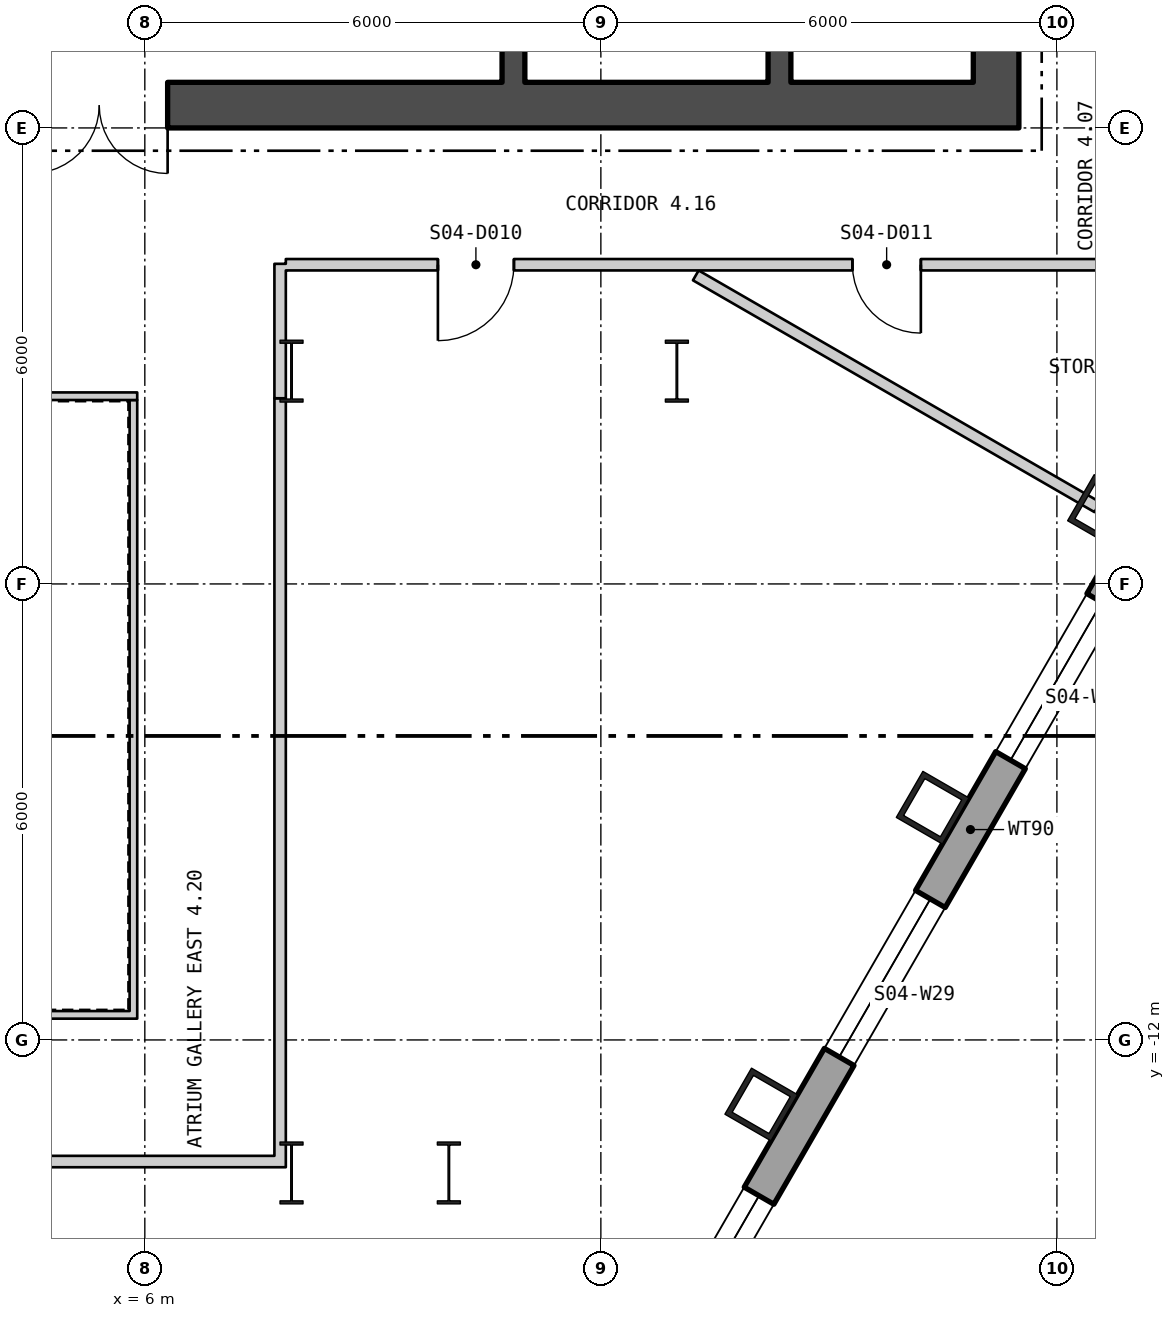
"""IFC4 building model, lengths in metres.
Left out: names, types, materials, properties, quantities, classifications, styles, units other than length and angle.
Written with IfcOpenShell. Run it as: python <this file> out.ifc"""

import sys

from ifc_helpers import new_model, si_unit, direction, frame, frame_2d, origin, origin_2d, place, context, subcontext, project, spatial, polyline, rectangle, hollow_rectangle, i_section, outline, extrude, element, fill, save


model = new_model("IFC4")
c1 = context("Model", 3, precision=1e-05, world=origin(), true_north=direction((0.0, 1.0)))
c2 = subcontext(c1, "Body", "Model", "MODEL_VIEW")
j1 = project(units=[si_unit("LENGTHUNIT", "METRE"), si_unit("PLANEANGLEUNIT", "RADIAN")], contexts=[c1])
p1 = place(None, origin())
s1 = spatial("IfcSite", under=j1, at=p1, CompositionType="ELEMENT")
p2 = place(p1, origin())
s2 = spatial("IfcBuilding", under=s1, at=p2, CompositionType="ELEMENT")
p3 = place(p2, frame((0.0, 0.0, 60.3)))
s3 = spatial("IfcBuildingStorey", under=s2, at=p3, CompositionType="ELEMENT", Elevation=60.3)
for number, where, z_axis, x_axis in (
    (1, (14.11, -12.849, 0.0), (0.0, 0.0, 1.0), (0.5, 0.866, 0.0)),
    (2, (16.365, -8.944, 0.0), (0.0, 0.0, 1.0), (0.5, 0.866, 0.0)),
    (3, (18.619, -5.04, 0.0), (0.0, 0.0, 1.0), (0.5, 0.866, 0.0)),
):
    element("IfcColumn", number, at=place(p3, frame(where, z_axis=z_axis, x_axis=x_axis)), inside=s3, PredefinedType="COLUMN", context=c2, shape_type="SweptSolid", body=[
        extrude(hollow_rectangle(XDim=0.7, YDim=0.7, WallThickness=0.07, at=origin_2d()), origin(), (0.0, 0.0, 1.0), 4.5),
    ])
for number, where, z_axis, x_axis in (
    (4, (7.93, -3.2, 0.0), (0.0, 0.0, 1.0), (1.0, 0.0, 0.0)),
    (5, (7.93, -13.75, 0.0), (0.0, 0.0, 1.0), (1.0, 0.0, 0.0)),
    (6, (13.0, -3.2, 0.0), (0.0, 0.0, 1.0), (1.0, 0.0, 0.0)),
    (7, (10.0, -13.75, 0.0), (0.0, 0.0, 1.0), (1.0, 0.0, 0.0)),
):
    element("IfcColumn", number, at=place(p3, frame(where, z_axis=z_axis, x_axis=x_axis)), inside=s3, PredefinedType="COLUMN", context=c2, shape_type="SweptSolid", body=[
        extrude(i_section(OverallWidth=0.303, OverallDepth=0.814, WebThickness=0.021, FlangeThickness=0.04, at=origin_2d()), origin(), (0.0, 0.0, 1.0), 4.5),
    ])
p4 = place(p3, frame((5.425, -29.042, -0.18), z_axis=(0.0, 0.0, 1.0), x_axis=(0.499999388847, 0.866025756634, 0.0)))
e8 = element("IfcWall", 8, at=p4, inside=s3, PredefinedType="SOLIDWALL", context=c2, shape_type="SweptSolid", body=[
    extrude(outline(polyline([(-0.13, -0.225), (45.88, -0.225), (45.62, 0.225), (0.13, 0.225), (-0.13, -0.225)])), origin(), (0.0, 0.0, 1.0), 4.28),
])
p5 = place(p4, frame((1.425, 0.0, 1.08)))
e9 = element("IfcOpeningElement", 9, at=p5, cuts=e8, PredefinedType="OPENING", context=c2, shape_type="SweptSolid", body=[
    extrude(rectangle(XDim=2.4, YDim=2.6, at=frame_2d((1.2, 1.3))), frame((0.0, 0.235, 0.0), z_axis=(0.0, -1.0, 0.0), x_axis=(1.0, 0.0, 0.0)), (0.0, 0.0, 1.0), 0.47),
])
p6 = place(p4, frame((5.895, 0.0, 1.08)))
e10 = element("IfcOpeningElement", 10, at=p6, cuts=e8, PredefinedType="OPENING", context=c2, shape_type="SweptSolid", body=[
    extrude(rectangle(XDim=2.4, YDim=2.6, at=frame_2d((1.2, 1.3))), frame((0.0, 0.235, 0.0), z_axis=(0.0, -1.0, 0.0), x_axis=(1.0, 0.0, 0.0)), (0.0, 0.0, 1.0), 0.47),
])
p7 = place(p4, frame((10.403, 0.0, 1.08)))
e11 = element("IfcOpeningElement", 11, at=p7, cuts=e8, PredefinedType="OPENING", context=c2, shape_type="SweptSolid", body=[
    extrude(rectangle(XDim=2.4, YDim=2.6, at=frame_2d((1.2, 1.3))), frame((0.0, 0.235, 0.0), z_axis=(0.0, -1.0, 0.0), x_axis=(1.0, 0.0, 0.0)), (0.0, 0.0, 1.0), 0.47),
])
p8 = place(p4, frame((14.912, 0.0, 1.08)))
e12 = element("IfcOpeningElement", 12, at=p8, cuts=e8, PredefinedType="OPENING", context=c2, shape_type="SweptSolid", body=[
    extrude(rectangle(XDim=2.4, YDim=2.6, at=frame_2d((1.2, 1.3))), frame((0.0, 0.235, 0.0), z_axis=(0.0, -1.0, 0.0), x_axis=(1.0, 0.0, 0.0)), (0.0, 0.0, 1.0), 0.47),
])
p9 = place(p4, frame((19.421, 0.0, 1.08)))
e13 = element("IfcOpeningElement", 13, at=p9, cuts=e8, PredefinedType="OPENING", context=c2, shape_type="SweptSolid", body=[
    extrude(rectangle(XDim=2.4, YDim=2.6, at=frame_2d((1.2, 1.3))), frame((0.0, 0.235, 0.0), z_axis=(0.0, -1.0, 0.0), x_axis=(1.0, 0.0, 0.0)), (0.0, 0.0, 1.0), 0.47),
])
p10 = place(p4, frame((23.929, 0.0, 1.08)))
e14 = element("IfcOpeningElement", 14, at=p10, cuts=e8, PredefinedType="OPENING", context=c2, shape_type="SweptSolid", body=[
    extrude(rectangle(XDim=2.4, YDim=2.6, at=frame_2d((1.2, 1.3))), frame((0.0, 0.235, 0.0), z_axis=(0.0, -1.0, 0.0), x_axis=(1.0, 0.0, 0.0)), (0.0, 0.0, 1.0), 0.47),
])
p11 = place(p4, frame((28.438, 0.0, 1.08)))
e15 = element("IfcOpeningElement", 15, at=p11, cuts=e8, PredefinedType="OPENING", context=c2, shape_type="SweptSolid", body=[
    extrude(rectangle(XDim=2.4, YDim=2.6, at=frame_2d((1.2, 1.3))), frame((0.0, 0.235, 0.0), z_axis=(0.0, -1.0, 0.0), x_axis=(1.0, 0.0, 0.0)), (0.0, 0.0, 1.0), 0.47),
])
p12 = place(p4, frame((32.947, 0.0, 1.08)))
e16 = element("IfcOpeningElement", 16, at=p12, cuts=e8, PredefinedType="OPENING", context=c2, shape_type="SweptSolid", body=[
    extrude(rectangle(XDim=2.4, YDim=2.6, at=frame_2d((1.2, 1.3))), frame((0.0, 0.235, 0.0), z_axis=(0.0, -1.0, 0.0), x_axis=(1.0, 0.0, 0.0)), (0.0, 0.0, 1.0), 0.47),
])
p13 = place(p4, frame((37.455, 0.0, 1.08)))
e17 = element("IfcOpeningElement", 17, at=p13, cuts=e8, PredefinedType="OPENING", context=c2, shape_type="SweptSolid", body=[
    extrude(rectangle(XDim=2.4, YDim=2.6, at=frame_2d((1.2, 1.3))), frame((0.0, 0.235, 0.0), z_axis=(0.0, -1.0, 0.0), x_axis=(1.0, 0.0, 0.0)), (0.0, 0.0, 1.0), 0.47),
])
p14 = place(p4, frame((41.925, 0.0, 1.08)))
e18 = element("IfcOpeningElement", 18, at=p14, cuts=e8, PredefinedType="OPENING", context=c2, shape_type="SweptSolid", body=[
    extrude(rectangle(XDim=2.4, YDim=2.6, at=frame_2d((1.2, 1.3))), frame((0.0, 0.235, 0.0), z_axis=(0.0, -1.0, 0.0), x_axis=(1.0, 0.0, 0.0)), (0.0, 0.0, 1.0), 0.47),
])
p15 = place(p3, frame((-5.9, -11.67, 0.0), z_axis=(0.0, 0.0, 1.0), x_axis=(1.0, 0.0, 0.0)))
e19 = element("IfcWall", 19, at=p15, inside=s3, PredefinedType="PARTITIONING", context=c2, shape_type="SweptSolid", body=[
    extrude(rectangle(XDim=11.8, YDim=0.1, at=frame_2d((5.9, 0.0))), origin(), (0.0, 0.0, 1.0), 4.3),
])
p16 = place(p3, frame((5.85, -11.62, 0.0), z_axis=(0.0, 0.0, 1.0), x_axis=(0.0, 1.0, 0.0)))
e20 = element("IfcWall", 20, at=p16, inside=s3, PredefinedType="PARTITIONING", context=c2, shape_type="SweptSolid", body=[
    extrude(rectangle(XDim=8.04, YDim=0.1, at=frame_2d((4.02, 0.0))), origin(), (0.0, 0.0, 1.0), 4.3),
])
p17 = place(p3, frame((5.9, -3.53, 0.0), z_axis=(0.0, 0.0, 1.0), x_axis=(-1.0, 0.0, 0.0)))
e21 = element("IfcWall", 21, at=p17, inside=s3, PredefinedType="PARTITIONING", context=c2, shape_type="SweptSolid", body=[
    extrude(rectangle(XDim=11.8, YDim=0.1, at=frame_2d((5.9, 0.0))), origin(), (0.0, 0.0, 1.0), 4.3),
])
p18 = place(p3, frame((-17.5, 0.3, 0.0), z_axis=(0.0, 0.0, 1.0), x_axis=(1.0, 0.0, 0.0)))
e22 = element("IfcWall", 22, at=p18, inside=s3, PredefinedType="SHEAR", context=c2, shape_type="SweptSolid", body=[
    extrude(rectangle(XDim=35.0, YDim=0.6, at=frame_2d((17.5, 0.0))), origin(), (0.0, 0.0, 1.0), 4.3),
])
p19 = place(p18, frame((12.0, 0.0, 0.0)))
e23 = element("IfcOpeningElement", 23, at=p19, cuts=e22, PredefinedType="OPENING", context=c2, shape_type="SweptSolid", body=[
    extrude(rectangle(XDim=1.8, YDim=2.4, at=frame_2d((0.9, 1.2))), frame((0.0, 0.31, 0.0), z_axis=(0.0, -1.0, 0.0), x_axis=(1.0, 0.0, 0.0)), (0.0, 0.0, 1.0), 0.62),
])
p20 = place(p18, frame((22.0, 0.0, 0.0)))
e24 = element("IfcOpeningElement", 24, at=p20, cuts=e22, PredefinedType="OPENING", context=c2, shape_type="SweptSolid", body=[
    extrude(rectangle(XDim=1.8, YDim=2.4, at=frame_2d((0.9, 1.2))), frame((0.0, 0.31, 0.0), z_axis=(0.0, -1.0, 0.0), x_axis=(1.0, 0.0, 0.0)), (0.0, 0.0, 1.0), 0.62),
])
p21 = place(p3, frame((17.2, 0.6, 0.0), z_axis=(0.0, 0.0, 1.0), x_axis=(0.0, 1.0, 0.0)))
e25 = element("IfcWall", 25, at=p21, inside=s3, PredefinedType="SHEAR", context=c2, shape_type="SweptSolid", body=[
    extrude(rectangle(XDim=16.8, YDim=0.6, at=frame_2d((8.4, 0.0))), origin(), (0.0, 0.0, 1.0), 4.3),
])
p22 = place(p21, frame((5.7, 0.0, 0.0)))
e26 = element("IfcOpeningElement", 26, at=p22, cuts=e25, PredefinedType="OPENING", context=c2, shape_type="SweptSolid", body=[
    extrude(rectangle(XDim=1.5, YDim=2.1, at=frame_2d((0.75, 1.05))), frame((0.0, 0.31, 0.0), z_axis=(0.0, -1.0, 0.0), x_axis=(1.0, 0.0, 0.0)), (0.0, 0.0, 1.0), 0.62),
])
p23 = place(p21, frame((0.454, 0.0, 0.0)))
e27 = element("IfcOpeningElement", 27, at=p23, cuts=e25, PredefinedType="OPENING", context=c2, shape_type="SweptSolid", body=[
    extrude(rectangle(XDim=1.0, YDim=2.1, at=frame_2d((0.5, 1.05))), frame((0.0, 0.31, 0.0), z_axis=(0.0, -1.0, 0.0), x_axis=(1.0, 0.0, 0.0)), (0.0, 0.0, 1.0), 0.62),
])
p24 = place(p21, frame((3.354, 0.0, 0.0)))
e28 = element("IfcOpeningElement", 28, at=p24, cuts=e25, PredefinedType="OPENING", context=c2, shape_type="SweptSolid", body=[
    extrude(rectangle(XDim=0.9, YDim=2.1, at=frame_2d((0.45, 1.05))), frame((0.0, 0.31, 0.0), z_axis=(0.0, -1.0, 0.0), x_axis=(1.0, 0.0, 0.0)), (0.0, 0.0, 1.0), 0.62),
])
p25 = place(p21, frame((10.527, 0.0, 0.0)))
e29 = element("IfcOpeningElement", 29, at=p25, cuts=e25, PredefinedType="OPENING", context=c2, shape_type="SweptSolid", body=[
    extrude(rectangle(XDim=0.9, YDim=2.1, at=frame_2d((0.45, 1.05))), frame((0.0, 0.31, 0.0), z_axis=(0.0, -1.0, 0.0), x_axis=(1.0, 0.0, 0.0)), (0.0, 0.0, 1.0), 0.62),
])
p26 = place(p21, frame((15.327, 0.0, 0.0)))
e30 = element("IfcOpeningElement", 30, at=p26, cuts=e25, PredefinedType="OPENING", context=c2, shape_type="SweptSolid", body=[
    extrude(rectangle(XDim=0.9, YDim=2.1, at=frame_2d((0.45, 1.05))), frame((0.0, 0.31, 0.0), z_axis=(0.0, -1.0, 0.0), x_axis=(1.0, 0.0, 0.0)), (0.0, 0.0, 1.0), 0.62),
])
p27 = place(p3, frame((10.85, 0.6, 0.0), z_axis=(0.0, 0.0, 1.0), x_axis=(0.0, 1.0, 0.0)))
e31 = element("IfcWall", 31, at=p27, inside=s3, PredefinedType="SHEAR", context=c2, shape_type="SweptSolid", body=[
    extrude(rectangle(XDim=16.8, YDim=0.3, at=frame_2d((8.4, 0.0))), origin(), (0.0, 0.0, 1.0), 4.3),
])
p28 = place(p27, frame((5.075, 0.0, 0.0)))
e32 = element("IfcOpeningElement", 32, at=p28, cuts=e31, PredefinedType="OPENING", context=c2, shape_type="SweptSolid", body=[
    extrude(rectangle(XDim=1.25, YDim=2.1, at=frame_2d((0.625, 1.05))), frame((0.0, 0.16, 0.0), z_axis=(0.0, -1.0, 0.0), x_axis=(1.0, 0.0, 0.0)), (0.0, 0.0, 1.0), 0.32),
])
p29 = place(p27, frame((1.525, 0.0, 0.0)))
e33 = element("IfcOpeningElement", 33, at=p29, cuts=e31, PredefinedType="OPENING", context=c2, shape_type="SweptSolid", body=[
    extrude(rectangle(XDim=1.0, YDim=2.1, at=frame_2d((0.5, 1.05))), frame((0.0, 0.16, 0.0), z_axis=(0.0, -1.0, 0.0), x_axis=(1.0, 0.0, 0.0)), (0.0, 0.0, 1.0), 0.32),
])
p30 = place(p3, frame((14.35, 0.6, 0.0), z_axis=(0.0, 0.0, 1.0), x_axis=(0.0, 1.0, 0.0)))
e34 = element("IfcWall", 34, at=p30, inside=s3, PredefinedType="SHEAR", context=c2, shape_type="SweptSolid", body=[
    extrude(rectangle(XDim=16.8, YDim=0.3, at=frame_2d((8.4, 0.0))), origin(), (0.0, 0.0, 1.0), 4.3),
])
p31 = place(p30, frame((5.7, 0.0, 0.0)))
e35 = element("IfcOpeningElement", 35, at=p31, cuts=e34, PredefinedType="OPENING", context=c2, shape_type="SweptSolid", body=[
    extrude(rectangle(XDim=1.5, YDim=2.1, at=frame_2d((0.75, 1.05))), frame((0.0, 0.16, 0.0), z_axis=(0.0, -1.0, 0.0), x_axis=(1.0, 0.0, 0.0)), (0.0, 0.0, 1.0), 0.32),
])
p32 = place(p3, frame((4.3, -13.6, 0.0), z_axis=(0.0, 0.0, 1.0), x_axis=(1.0, 0.0, 0.0)))
e36 = element("IfcWall", 36, at=p32, inside=s3, PredefinedType="PARTITIONING", context=c2, shape_type="SweptSolid", body=[
    extrude(rectangle(XDim=3.405, YDim=0.15, at=frame_2d((1.702, 0.0))), origin(), (0.0, 0.0, 1.0), 3.39),
])
p33 = place(p3, frame((7.78, -13.675, 0.0), z_axis=(0.0, 0.0, 1.0), x_axis=(0.0, 1.0, 0.0)))
e37 = element("IfcWall", 37, at=p33, inside=s3, PredefinedType="PARTITIONING", context=c2, shape_type="SweptSolid", body=[
    extrude(rectangle(XDim=10.118, YDim=0.15, at=frame_2d((5.059, 0.0))), origin(), (0.0, 0.0, 1.0), 3.61),
])
p34 = place(p3, frame((7.78, -3.557, 0.0), z_axis=(0.0, 0.0, 1.0), x_axis=(0.0, 1.0, 0.0)))
e38 = element("IfcWall", 38, at=p34, inside=s3, PredefinedType="PARTITIONING", context=c2, shape_type="SweptSolid", body=[
    extrude(rectangle(XDim=1.769, YDim=0.15, at=frame_2d((0.884, 0.0))), origin(), (0.0, 0.0, 1.0), 4.3),
])
p35 = place(p3, frame((7.855, -1.8, 0.0), z_axis=(0.0, 0.0, 1.0), x_axis=(1.0, 0.0, 0.0)))
e39 = element("IfcWall", 39, at=p35, inside=s3, PredefinedType="PARTITIONING", context=c2, shape_type="SweptSolid", body=[
    extrude(rectangle(XDim=11.37, YDim=0.15, at=frame_2d((5.685, 0.0))), origin(), (0.0, 0.0, 1.0), 4.3),
])
p36 = place(p35, frame((2.001, 0.0, 0.0)))
e40 = element("IfcOpeningElement", 40, at=p36, cuts=e39, PredefinedType="OPENING", context=c2, shape_type="SweptSolid", body=[
    extrude(rectangle(XDim=1.0, YDim=2.1, at=frame_2d((0.5, 1.05))), frame((0.0, 0.085, 0.0), z_axis=(0.0, -1.0, 0.0), x_axis=(1.0, 0.0, 0.0)), (0.0, 0.0, 1.0), 0.17),
])
p37 = place(p35, frame((7.455, 0.0, 0.0)))
e41 = element("IfcOpeningElement", 41, at=p37, cuts=e39, PredefinedType="OPENING", context=c2, shape_type="SweptSolid", body=[
    extrude(rectangle(XDim=0.9, YDim=2.1, at=frame_2d((0.45, 1.05))), frame((0.0, 0.085, 0.0), z_axis=(0.0, -1.0, 0.0), x_axis=(1.0, 0.0, 0.0)), (0.0, 0.0, 1.0), 0.17),
])
p38 = place(p3, frame((13.249, -1.94, 0.0), z_axis=(0.0, 0.0, 1.0), x_axis=(0.866035445757, -0.49998260639, 0.0)))
e42 = element("IfcWall", 42, at=p38, inside=s3, PredefinedType="PARTITIONING", context=c2, shape_type="SweptSolid", body=[
    extrude(rectangle(XDim=6.1, YDim=0.15, at=frame_2d((3.05, 0.0))), origin(), (0.0, 0.0, 1.0), 4.3),
])
p39 = place(p8, origin())
e43 = element("IfcWindow", 43, at=p39, inside=s3, PartitioningType="SINGLE_PANEL", PredefinedType="WINDOW", context=c2, shape_type="SweptSolid", body=[
    extrude(rectangle(XDim=2.4, YDim=2.6, at=frame_2d((1.2, 1.3))), frame((0.0, 0.105, 0.0), z_axis=(0.0, -1.0, 0.0), x_axis=(1.0, 0.0, 0.0)), (0.0, 0.0, 1.0), 0.06),
])
fill(e12, e43)
p40 = place(p9, origin())
e44 = element("IfcWindow", 44, at=p40, inside=s3, PartitioningType="SINGLE_PANEL", PredefinedType="WINDOW", context=c2, shape_type="SweptSolid", body=[
    extrude(rectangle(XDim=2.4, YDim=2.6, at=frame_2d((1.2, 1.3))), frame((0.0, 0.105, 0.0), z_axis=(0.0, -1.0, 0.0), x_axis=(1.0, 0.0, 0.0)), (0.0, 0.0, 1.0), 0.06),
])
fill(e13, e44)
p41 = place(p10, origin())
e45 = element("IfcWindow", 45, at=p41, inside=s3, PartitioningType="SINGLE_PANEL", PredefinedType="WINDOW", context=c2, shape_type="SweptSolid", body=[
    extrude(rectangle(XDim=2.4, YDim=2.6, at=frame_2d((1.2, 1.3))), frame((0.0, 0.105, 0.0), z_axis=(0.0, -1.0, 0.0), x_axis=(1.0, 0.0, 0.0)), (0.0, 0.0, 1.0), 0.06),
])
fill(e14, e45)
p42 = place(p20, origin())
e46 = element("IfcDoor", 46, at=p42, inside=s3, OperationType="DOUBLE_DOOR_SINGLE_SWING", PredefinedType="DOOR", context=c2, shape_type="SweptSolid", body=[
    extrude(rectangle(XDim=1.8, YDim=2.4, at=frame_2d((0.9, 1.2))), frame((0.0, 0.025, 0.0), z_axis=(0.0, -1.0, 0.0), x_axis=(1.0, 0.0, 0.0)), (0.0, 0.0, 1.0), 0.05),
])
fill(e24, e46)
p43 = place(p36, origin())
e47 = element("IfcDoor", 47, at=p43, inside=s3, OperationType="SINGLE_SWING_LEFT", PredefinedType="DOOR", context=c2, shape_type="SweptSolid", body=[
    extrude(rectangle(XDim=1.0, YDim=2.1, at=frame_2d((0.5, 1.05))), frame((0.0, 0.025, 0.0), z_axis=(0.0, -1.0, 0.0), x_axis=(1.0, 0.0, 0.0)), (0.0, 0.0, 1.0), 0.05),
])
fill(e40, e47)
p44 = place(p37, origin())
e48 = element("IfcDoor", 48, at=p44, inside=s3, OperationType="SINGLE_SWING_RIGHT", PredefinedType="DOOR", context=c2, shape_type="SweptSolid", body=[
    extrude(rectangle(XDim=0.9, YDim=2.1, at=frame_2d((0.45, 1.05))), frame((0.0, 0.025, 0.0), z_axis=(0.0, -1.0, 0.0), x_axis=(1.0, 0.0, 0.0)), (0.0, 0.0, 1.0), 0.05),
])
fill(e41, e48)
save(model, sys.argv[1])
